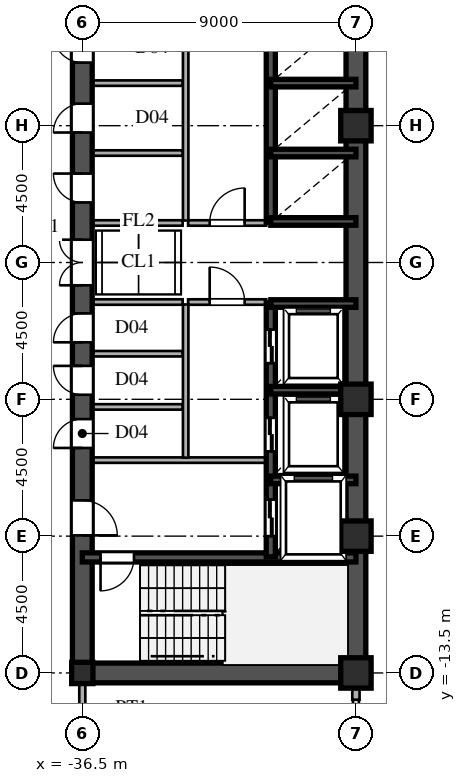
"""IFC4 building model, lengths in metres.
Left out: names, types, materials, properties, quantities, classifications, styles, units other than length and angle.
Written with IfcOpenShell. Run it as: python <this file> out.ifc"""

import sys

from ifc_helpers import new_model, si_unit, direction, frame, frame_2d, origin, origin_2d, place, context, subcontext, project, spatial, rectangle, hollow_rectangle, i_section, extrude, source, transform, mapped, element, fill, save


model = new_model("IFC4")
c1 = context("Model", 3, precision=1e-05, world=origin(), true_north=direction((0.0, 1.0)))
c2 = subcontext(c1, "Body", "Model", "MODEL_VIEW")
j1 = project(units=[si_unit("LENGTHUNIT", "METRE"), si_unit("PLANEANGLEUNIT", "RADIAN")], contexts=[c1])
p1 = place(None, origin())
s1 = spatial("IfcSite", under=j1, at=p1, CompositionType="ELEMENT")
p2 = place(p1, origin())
s2 = spatial("IfcBuilding", under=s1, at=p2, CompositionType="ELEMENT")
p3 = place(p2, frame((0.0, 0.0, 124.8)))
s3 = spatial("IfcBuildingStorey", under=s2, at=p3, CompositionType="ELEMENT", Elevation=124.8)
m1 = source(origin(), c2, "Body", "SweptSolid", [
    extrude(hollow_rectangle(XDim=1.0, YDim=1.0, WallThickness=0.042, at=origin_2d()), origin(), (0.0, 0.0, 1.0), 3.6),
])
for number, where, z_axis, x_axis in (
    (1, (-27.5, -13.5, 0.0), (0.0, 0.0, 1.0), (1.0, 0.0, 0.0)),
    (2, (-27.5, -9.0, 0.0), (0.0, 0.0, 1.0), (1.0, 0.0, 0.0)),
    (3, (-27.5, -4.5, 0.0), (0.0, 0.0, 1.0), (1.0, 0.0, 0.0)),
    (4, (-27.5, 4.5, 0.0), (0.0, 0.0, 1.0), (1.0, 0.0, 0.0)),
):
    element("IfcColumn", number, at=place(p3, frame(where, z_axis=z_axis, x_axis=x_axis)), inside=s3, PredefinedType="COLUMN", context=c2, shape_type="MappedRepresentation", body=[
        mapped(m1, transform((0.0, 0.0, 0.0), scale=1.0)),
    ])
m2 = source(origin(), c2, "Body", "SweptSolid", [
    extrude(i_section(OverallWidth=0.7, OverallDepth=0.7, WebThickness=0.028, FlangeThickness=0.045, at=origin_2d()), origin(), (0.0, 0.0, 1.0), 3.6),
])
p4 = place(p3, frame((-36.5, -13.5, 0.0), z_axis=(0.0, 0.0, 1.0), x_axis=(1.0, 0.0, 0.0)))
e5 = element("IfcColumn", 5, at=p4, inside=s3, PredefinedType="COLUMN", context=c2, shape_type="MappedRepresentation", body=[
    mapped(m2, transform((0.0, 0.0, 0.0), scale=1.0)),
])
p5 = place(p3, frame((-27.5, -14.38, 0.0), z_axis=(0.0, 0.0, 1.0), x_axis=(0.0, 1.0, 0.0)))
e6 = element("IfcWall", 6, at=p5, inside=s3, PredefinedType="SOLIDWALL", context=c2, shape_type="SweptSolid", body=[
    extrude(rectangle(XDim=0.55, YDim=0.24, at=frame_2d((0.275, 0.0))), origin(), (0.0, 0.0, 1.0), 2.88),
])
for number, where, z_axis, x_axis in (
    (7, (-27.5, -13.5, 0.0), (0.0, 0.0, 1.0), (0.0, 1.0, 0.0)),
    (8, (-27.5, 1.3, 0.0), (0.0, 0.0, 1.0), (0.0, 1.0, 0.0)),
):
    element("IfcWall", number, at=place(p3, frame(where, z_axis=z_axis, x_axis=x_axis)), inside=s3, PredefinedType="SHEAR", context=c2, shape_type="SweptSolid", body=[
        extrude(rectangle(XDim=12.2, YDim=0.65, at=frame_2d((6.1, 0.0))), origin(), (0.0, 0.0, 1.0), 3.38),
    ])
p6 = place(p3, frame((-27.5, -1.3, 0.0), z_axis=(0.0, 0.0, 1.0), x_axis=(0.0, 1.0, 0.0)))
e9 = element("IfcWall", 9, at=p6, inside=s3, PredefinedType="SHEAR", context=c2, shape_type="SweptSolid", body=[
    extrude(rectangle(XDim=2.6, YDim=0.65, at=frame_2d((1.3, 0.0))), origin(), (0.0, 0.0, 1.0), 3.38),
])
p7 = place(p3, frame((-36.5, -13.5, 0.0), z_axis=(0.0, 0.0, 1.0), x_axis=(1.0, 0.0, 0.0)))
e10 = element("IfcWall", 10, at=p7, inside=s3, PredefinedType="SHEAR", context=c2, shape_type="SweptSolid", body=[
    extrude(rectangle(XDim=9.0, YDim=0.65, at=frame_2d((4.5, 0.0))), origin(), (0.0, 0.0, 1.0), 3.38),
])
p8 = place(p3, frame((-36.5, -13.65, 0.0), z_axis=(0.0, 0.0, 1.0), x_axis=(0.0, 1.0, 0.0)))
e11 = element("IfcWall", 11, at=p8, inside=s3, PredefinedType="SHEAR", context=c2, shape_type="SweptSolid", body=[
    extrude(rectangle(XDim=7.15, YDim=0.65, at=frame_2d((3.575, 0.0))), origin(), (0.0, 0.0, 1.0), 3.38),
])
p9 = place(p8, frame((4.675, 0.0, 0.0)))
e12 = element("IfcOpeningElement", 12, at=p9, cuts=e11, PredefinedType="OPENING", context=c2, shape_type="SweptSolid", body=[
    extrude(rectangle(XDim=1.15, YDim=2.2, at=frame_2d((0.575, 1.1))), frame((0.0, 0.335, 0.0), z_axis=(0.0, -1.0, 0.0), x_axis=(1.0, 0.0, 0.0)), (0.0, 0.0, 1.0), 0.67),
])
p10 = place(p3, frame((-36.5, -1.3, 0.0), z_axis=(0.0, 0.0, 1.0), x_axis=(0.0, 1.0, 0.0)))
e13 = element("IfcWall", 13, at=p10, inside=s3, PredefinedType="SHEAR", context=c2, shape_type="SweptSolid", body=[
    extrude(rectangle(XDim=2.6, YDim=0.65, at=frame_2d((1.3, 0.0))), origin(), (0.0, 0.0, 1.0), 3.38),
])
p11 = place(p10, frame((0.55, 0.0, 0.0)))
e14 = element("IfcOpeningElement", 14, at=p11, cuts=e13, PredefinedType="OPENING", context=c2, shape_type="SweptSolid", body=[
    extrude(rectangle(XDim=1.5, YDim=2.3, at=frame_2d((0.75, 1.15))), frame((0.0, 0.335, 0.0), z_axis=(0.0, -1.0, 0.0), x_axis=(1.0, 0.0, 0.0)), (0.0, 0.0, 1.0), 0.67),
])
p12 = place(p3, frame((-36.5, -6.5, 0.0), z_axis=(0.0, 0.0, 1.0), x_axis=(0.0, 1.0, 0.0)))
e15 = element("IfcWall", 15, at=p12, inside=s3, PredefinedType="SHEAR", context=c2, shape_type="SweptSolid", body=[
    extrude(rectangle(XDim=1.75, YDim=0.65, at=frame_2d((0.875, 0.0))), origin(), (0.0, 0.0, 1.0), 3.38),
])
p13 = place(p12, frame((0.4, 0.0, 0.0)))
e16 = element("IfcOpeningElement", 16, at=p13, cuts=e15, PredefinedType="OPENING", context=c2, shape_type="SweptSolid", body=[
    extrude(rectangle(XDim=0.95, YDim=2.15, at=frame_2d((0.475, 1.075))), frame((0.0, 0.335, 0.0), z_axis=(0.0, -1.0, 0.0), x_axis=(1.0, 0.0, 0.0)), (0.0, 0.0, 1.0), 0.67),
])
p14 = place(p3, frame((-36.5, -4.75, 0.0), z_axis=(0.0, 0.0, 1.0), x_axis=(0.0, 1.0, 0.0)))
e17 = element("IfcWall", 17, at=p14, inside=s3, PredefinedType="SHEAR", context=c2, shape_type="SweptSolid", body=[
    extrude(rectangle(XDim=1.75, YDim=0.65, at=frame_2d((0.875, 0.0))), origin(), (0.0, 0.0, 1.0), 3.38),
])
p15 = place(p14, frame((0.4, 0.0, 0.0)))
e18 = element("IfcOpeningElement", 18, at=p15, cuts=e17, PredefinedType="OPENING", context=c2, shape_type="SweptSolid", body=[
    extrude(rectangle(XDim=0.95, YDim=2.15, at=frame_2d((0.475, 1.075))), frame((0.0, 0.335, 0.0), z_axis=(0.0, -1.0, 0.0), x_axis=(1.0, 0.0, 0.0)), (0.0, 0.0, 1.0), 0.67),
])
p16 = place(p3, frame((-36.5, -3.0, 0.0), z_axis=(0.0, 0.0, 1.0), x_axis=(0.0, 1.0, 0.0)))
e19 = element("IfcWall", 19, at=p16, inside=s3, PredefinedType="SHEAR", context=c2, shape_type="SweptSolid", body=[
    extrude(rectangle(XDim=1.7, YDim=0.65, at=frame_2d((0.85, 0.0))), origin(), (0.0, 0.0, 1.0), 3.38),
])
p17 = place(p16, frame((0.375, 0.0, 0.0)))
e20 = element("IfcOpeningElement", 20, at=p17, cuts=e19, PredefinedType="OPENING", context=c2, shape_type="SweptSolid", body=[
    extrude(rectangle(XDim=0.95, YDim=2.15, at=frame_2d((0.475, 1.075))), frame((0.0, 0.335, 0.0), z_axis=(0.0, -1.0, 0.0), x_axis=(1.0, 0.0, 0.0)), (0.0, 0.0, 1.0), 0.67),
])
p18 = place(p3, frame((-36.5, 1.3, 0.0), z_axis=(0.0, 0.0, 1.0), x_axis=(0.0, 1.0, 0.0)))
e21 = element("IfcWall", 21, at=p18, inside=s3, PredefinedType="SHEAR", context=c2, shape_type="SweptSolid", body=[
    extrude(rectangle(XDim=2.3, YDim=0.65, at=frame_2d((1.15, 0.0))), origin(), (0.0, 0.0, 1.0), 3.38),
])
p19 = place(p18, frame((0.675, 0.0, 0.0)))
e22 = element("IfcOpeningElement", 22, at=p19, cuts=e21, PredefinedType="OPENING", context=c2, shape_type="SweptSolid", body=[
    extrude(rectangle(XDim=0.95, YDim=2.15, at=frame_2d((0.475, 1.075))), frame((0.0, 0.335, 0.0), z_axis=(0.0, -1.0, 0.0), x_axis=(1.0, 0.0, 0.0)), (0.0, 0.0, 1.0), 0.67),
])
p20 = place(p3, frame((-36.5, 3.6, 0.0), z_axis=(0.0, 0.0, 1.0), x_axis=(0.0, 1.0, 0.0)))
e23 = element("IfcWall", 23, at=p20, inside=s3, PredefinedType="SHEAR", context=c2, shape_type="SweptSolid", body=[
    extrude(rectangle(XDim=2.3, YDim=0.65, at=frame_2d((1.15, 0.0))), origin(), (0.0, 0.0, 1.0), 3.38),
])
p21 = place(p20, frame((0.675, 0.0, 0.0)))
e24 = element("IfcOpeningElement", 24, at=p21, cuts=e23, PredefinedType="OPENING", context=c2, shape_type="SweptSolid", body=[
    extrude(rectangle(XDim=0.95, YDim=2.15, at=frame_2d((0.475, 1.075))), frame((0.0, 0.335, 0.0), z_axis=(0.0, -1.0, 0.0), x_axis=(1.0, 0.0, 0.0)), (0.0, 0.0, 1.0), 0.67),
])
p22 = place(p3, frame((-36.5, 5.9, 0.0), z_axis=(0.0, 0.0, 1.0), x_axis=(0.0, 1.0, 0.0)))
e25 = element("IfcWall", 25, at=p22, inside=s3, PredefinedType="SHEAR", context=c2, shape_type="SweptSolid", body=[
    extrude(rectangle(XDim=2.3, YDim=0.65, at=frame_2d((1.15, 0.0))), origin(), (0.0, 0.0, 1.0), 3.38),
])
p23 = place(p22, frame((0.675, 0.0, 0.0)))
e26 = element("IfcOpeningElement", 26, at=p23, cuts=e25, PredefinedType="OPENING", context=c2, shape_type="SweptSolid", body=[
    extrude(rectangle(XDim=0.95, YDim=2.15, at=frame_2d((0.475, 1.075))), frame((0.0, 0.335, 0.0), z_axis=(0.0, -1.0, 0.0), x_axis=(1.0, 0.0, 0.0)), (0.0, 0.0, 1.0), 0.67),
])
p24 = place(p3, frame((-36.5, -9.7, 0.0), z_axis=(0.0, 0.0, 1.0), x_axis=(1.0, 0.0, 0.0)))
e27 = element("IfcWall", 27, at=p24, inside=s3, PredefinedType="SHEAR", context=c2, shape_type="SweptSolid", body=[
    extrude(rectangle(XDim=9.0, YDim=0.3, at=frame_2d((4.5, 0.0))), origin(), (0.0, 0.0, 1.0), 3.38),
])
p25 = place(p24, frame((0.6, 0.0, 0.0)))
e28 = element("IfcOpeningElement", 28, at=p25, cuts=e27, PredefinedType="OPENING", context=c2, shape_type="SweptSolid", body=[
    extrude(rectangle(XDim=1.1, YDim=2.2, at=frame_2d((0.55, 1.1))), frame((0.0, 0.16, 0.0), z_axis=(0.0, -1.0, 0.0), x_axis=(1.0, 0.0, 0.0)), (0.0, 0.0, 1.0), 0.32),
])
for number, where, z_axis, x_axis in (
    (29, (-30.3, -7.15, 0.0), (0.0, 0.0, 1.0), (1.0, 0.0, 0.0)),
    (30, (-30.3, -4.2, 0.0), (0.0, 0.0, 1.0), (1.0, 0.0, 0.0)),
    (31, (-30.3, -1.35, 0.0), (0.0, 0.0, 1.0), (1.0, 0.0, 0.0)),
    (32, (-30.3, 1.35, 0.0), (0.0, 0.0, 1.0), (1.0, 0.0, 0.0)),
    (33, (-30.3, 3.6, 0.0), (0.0, 0.0, 1.0), (1.0, 0.0, 0.0)),
    (34, (-30.3, 5.9, 0.0), (0.0, 0.0, 1.0), (1.0, 0.0, 0.0)),
):
    element("IfcWall", number, at=place(p3, frame(where, z_axis=z_axis, x_axis=x_axis)), inside=s3, PredefinedType="SHEAR", context=c2, shape_type="SweptSolid", body=[
        extrude(rectangle(XDim=2.8, YDim=0.25, at=frame_2d((1.4, 0.0))), origin(), (0.0, 0.0, 1.0), 3.38),
    ])
p26 = place(p3, frame((-30.3, -9.68, 0.0), z_axis=(0.0, 0.0, 1.0), x_axis=(0.0, 1.0, 0.0)))
e35 = element("IfcWall", 35, at=p26, inside=s3, PredefinedType="SHEAR", context=c2, shape_type="SweptSolid", body=[
    extrude(rectangle(XDim=2.56, YDim=0.3, at=frame_2d((1.28, 0.0))), origin(), (0.0, 0.0, 1.0), 3.38),
])
p27 = place(p26, frame((0.68, 0.0, 0.0)))
e36 = element("IfcOpeningElement", 36, at=p27, cuts=e35, PredefinedType="OPENING", context=c2, shape_type="SweptSolid", body=[
    extrude(rectangle(XDim=1.2, YDim=2.25, at=frame_2d((0.6, 1.125))), frame((0.0, 0.16, 0.0), z_axis=(0.0, -1.0, 0.0), x_axis=(1.0, 0.0, 0.0)), (0.0, 0.0, 1.0), 0.32),
])
p28 = place(p3, frame((-30.3, -7.12, 0.0), z_axis=(0.0, 0.0, 1.0), x_axis=(0.0, 1.0, 0.0)))
e37 = element("IfcWall", 37, at=p28, inside=s3, PredefinedType="SHEAR", context=c2, shape_type="SweptSolid", body=[
    extrude(rectangle(XDim=2.92, YDim=0.3, at=frame_2d((1.46, 0.0))), origin(), (0.0, 0.0, 1.0), 3.38),
])
p29 = place(p28, frame((0.91, 0.0, 0.0)))
e38 = element("IfcOpeningElement", 38, at=p29, cuts=e37, PredefinedType="OPENING", context=c2, shape_type="SweptSolid", body=[
    extrude(rectangle(XDim=1.1, YDim=2.2, at=frame_2d((0.55, 1.1))), frame((0.0, 0.16, 0.0), z_axis=(0.0, -1.0, 0.0), x_axis=(1.0, 0.0, 0.0)), (0.0, 0.0, 1.0), 0.32),
])
p30 = place(p3, frame((-30.3, -4.2, 0.0), z_axis=(0.0, 0.0, 1.0), x_axis=(0.0, 1.0, 0.0)))
e39 = element("IfcWall", 39, at=p30, inside=s3, PredefinedType="SHEAR", context=c2, shape_type="SweptSolid", body=[
    extrude(rectangle(XDim=2.88, YDim=0.3, at=frame_2d((1.44, 0.0))), origin(), (0.0, 0.0, 1.0), 3.38),
])
p31 = place(p30, frame((0.89, 0.0, 0.0)))
e40 = element("IfcOpeningElement", 40, at=p31, cuts=e39, PredefinedType="OPENING", context=c2, shape_type="SweptSolid", body=[
    extrude(rectangle(XDim=1.1, YDim=2.2, at=frame_2d((0.55, 1.1))), frame((0.0, 0.16, 0.0), z_axis=(0.0, -1.0, 0.0), x_axis=(1.0, 0.0, 0.0)), (0.0, 0.0, 1.0), 0.32),
])
p32 = place(p3, frame((-30.3, 1.32, 0.0), z_axis=(0.0, 0.0, 1.0), x_axis=(0.0, 1.0, 0.0)))
e41 = element("IfcWall", 41, at=p32, inside=s3, PredefinedType="SHEAR", context=c2, shape_type="SweptSolid", body=[
    extrude(rectangle(XDim=2.28, YDim=0.3, at=frame_2d((1.14, 0.0))), origin(), (0.0, 0.0, 1.0), 3.38),
])
p33 = place(p3, frame((-30.3, 3.6, 0.0), z_axis=(0.0, 0.0, 1.0), x_axis=(0.0, 1.0, 0.0)))
e42 = element("IfcWall", 42, at=p33, inside=s3, PredefinedType="SHEAR", context=c2, shape_type="SweptSolid", body=[
    extrude(rectangle(XDim=2.3, YDim=0.3, at=frame_2d((1.15, 0.0))), origin(), (0.0, 0.0, 1.0), 3.38),
])
p34 = place(p3, frame((-30.3, 5.9, 0.0), z_axis=(0.0, 0.0, 1.0), x_axis=(0.0, 1.0, 0.0)))
e43 = element("IfcWall", 43, at=p34, inside=s3, PredefinedType="SHEAR", context=c2, shape_type="SweptSolid", body=[
    extrude(rectangle(XDim=2.25, YDim=0.3, at=frame_2d((1.125, 0.0))), origin(), (0.0, 0.0, 1.0), 3.38),
])
p35 = place(p3, frame((-36.15, -6.5, 0.0), z_axis=(0.0, 0.0, 1.0), x_axis=(1.0, 0.0, 0.0)))
e44 = element("IfcWall", 44, at=p35, inside=s3, PredefinedType="PARTITIONING", context=c2, shape_type="SweptSolid", body=[
    extrude(rectangle(XDim=5.7, YDim=0.18, at=frame_2d((2.85, 0.0))), origin(), (0.0, 0.0, 1.0), 3.38),
])
p36 = place(p3, frame((-33.1, -6.42, 0.0), z_axis=(0.0, 0.0, 1.0), x_axis=(0.0, 1.0, 0.0)))
e45 = element("IfcWall", 45, at=p36, inside=s3, PredefinedType="PARTITIONING", context=c2, shape_type="SweptSolid", body=[
    extrude(rectangle(XDim=5.04, YDim=0.18, at=frame_2d((2.52, 0.0))), origin(), (0.0, 0.0, 1.0), 3.38),
])
p37 = place(p3, frame((-33.1, 1.38, 0.0), z_axis=(0.0, 0.0, 1.0), x_axis=(0.0, 1.0, 0.0)))
e46 = element("IfcWall", 46, at=p37, inside=s3, PredefinedType="PARTITIONING", context=c2, shape_type="SweptSolid", body=[
    extrude(rectangle(XDim=6.74, YDim=0.18, at=frame_2d((3.37, 0.0))), origin(), (0.0, 0.0, 1.0), 3.38),
])
p38 = place(p3, frame((-33.02, -1.3, 0.0), z_axis=(0.0, 0.0, 1.0), x_axis=(1.0, 0.0, 0.0)))
e47 = element("IfcWall", 47, at=p38, inside=s3, PredefinedType="PARTITIONING", context=c2, shape_type="SweptSolid", body=[
    extrude(rectangle(XDim=2.57, YDim=0.18, at=frame_2d((1.285, 0.0))), origin(), (0.0, 0.0, 1.0), 3.38),
])
p39 = place(p38, frame((0.71, 0.0, 0.0)))
e48 = element("IfcOpeningElement", 48, at=p39, cuts=e47, PredefinedType="OPENING", context=c2, shape_type="SweptSolid", body=[
    extrude(rectangle(XDim=1.15, YDim=2.2, at=frame_2d((0.575, 1.1))), frame((0.0, 0.1, 0.0), z_axis=(0.0, -1.0, 0.0), x_axis=(1.0, 0.0, 0.0)), (0.0, 0.0, 1.0), 0.2),
])
p40 = place(p3, frame((-33.02, 1.3, 0.0), z_axis=(0.0, 0.0, 1.0), x_axis=(1.0, 0.0, 0.0)))
e49 = element("IfcWall", 49, at=p40, inside=s3, PredefinedType="PARTITIONING", context=c2, shape_type="SweptSolid", body=[
    extrude(rectangle(XDim=2.57, YDim=0.18, at=frame_2d((1.285, 0.0))), origin(), (0.0, 0.0, 1.0), 3.38),
])
p41 = place(p40, frame((0.71, 0.0, 0.0)))
e50 = element("IfcOpeningElement", 50, at=p41, cuts=e49, PredefinedType="OPENING", context=c2, shape_type="SweptSolid", body=[
    extrude(rectangle(XDim=1.15, YDim=2.2, at=frame_2d((0.575, 1.1))), frame((0.0, 0.1, 0.0), z_axis=(0.0, -1.0, 0.0), x_axis=(1.0, 0.0, 0.0)), (0.0, 0.0, 1.0), 0.2),
])
for number, where, z_axis, x_axis in (
    (51, (-36.15, -1.3, 0.0), (0.0, 0.0, 1.0), (1.0, 0.0, 0.0)),
    (52, (-36.15, 1.3, 0.0), (0.0, 0.0, 1.0), (1.0, 0.0, 0.0)),
    (53, (-36.15, -4.75, 0.0), (0.0, 0.0, 1.0), (1.0, 0.0, 0.0)),
    (54, (-36.15, -3.0, 0.0), (0.0, 0.0, 1.0), (1.0, 0.0, 0.0)),
    (55, (-36.15, 3.6, 0.0), (0.0, 0.0, 1.0), (1.0, 0.0, 0.0)),
    (56, (-36.15, 5.9, 0.0), (0.0, 0.0, 1.0), (1.0, 0.0, 0.0)),
):
    element("IfcWall", number, at=place(p3, frame(where, z_axis=z_axis, x_axis=x_axis)), inside=s3, PredefinedType="PARTITIONING", context=c2, shape_type="SweptSolid", body=[
        extrude(rectangle(XDim=2.95, YDim=0.18, at=frame_2d((1.475, 0.0))), origin(), (0.0, 0.0, 1.0), 3.38),
    ])
p42 = place(p3, frame((-36.5, -15.515, 0.0), z_axis=(0.0, 0.0, 1.0), x_axis=(0.0, 1.0, 0.0)))
e57 = element("IfcWall", 57, at=p42, inside=s3, PredefinedType="PARTITIONING", context=c2, shape_type="SweptSolid", body=[
    extrude(rectangle(XDim=1.685, YDim=0.2, at=frame_2d((0.842, 0.0))), origin(), (0.0, 0.0, 1.0), 2.78),
])
m3 = source(origin(), c2, "Body", "SweptSolid", [
    extrude(rectangle(XDim=1.15, YDim=2.2, at=frame_2d((0.575, 1.1))), frame((0.0, 0.025, 0.0), z_axis=(0.0, -1.0, 0.0), x_axis=(1.0, 0.0, 0.0)), (0.0, 0.0, 1.0), 0.05),
])
p43 = place(p9, frame((1.15, 0.0, 0.0), z_axis=(0.0, 0.0, 1.0), x_axis=(-1.0, 0.0, 0.0)))
e58 = element("IfcDoor", 58, at=p43, inside=s3, OperationType="SINGLE_SWING_LEFT", PredefinedType="DOOR", context=c2, shape_type="MappedRepresentation", body=[
    mapped(m3, transform((0.0, 0.0, 0.0), scale=1.0)),
])
fill(e12, e58)
m4 = source(origin(), c2, "Body", "SweptSolid", [
    extrude(rectangle(XDim=1.5, YDim=2.3, at=frame_2d((0.75, 1.15))), frame((0.0, 0.025, 0.0), z_axis=(0.0, -1.0, 0.0), x_axis=(1.0, 0.0, 0.0)), (0.0, 0.0, 1.0), 0.05),
])
p44 = place(p11, origin())
e59 = element("IfcDoor", 59, at=p44, inside=s3, OperationType="DOUBLE_SWING_LEFT", PredefinedType="DOOR", context=c2, shape_type="MappedRepresentation", body=[
    mapped(m4, transform((0.0, 0.0, 0.0), scale=1.0)),
])
fill(e14, e59)
m5 = source(origin(), c2, "Body", "SweptSolid", [
    extrude(rectangle(XDim=0.95, YDim=2.15, at=frame_2d((0.475, 1.075))), frame((0.0, 0.025, 0.0), z_axis=(0.0, -1.0, 0.0), x_axis=(1.0, 0.0, 0.0)), (0.0, 0.0, 1.0), 0.05),
])
p45 = place(p13, origin())
e60 = element("IfcDoor", 60, at=p45, inside=s3, OperationType="SINGLE_SWING_LEFT", PredefinedType="DOOR", context=c2, shape_type="MappedRepresentation", body=[
    mapped(m5, transform((0.0, 0.0, 0.0), scale=1.0)),
])
fill(e16, e60)
p46 = place(p15, origin())
e61 = element("IfcDoor", 61, at=p46, inside=s3, OperationType="SINGLE_SWING_RIGHT", PredefinedType="DOOR", context=c2, shape_type="MappedRepresentation", body=[
    mapped(m5, transform((0.0, 0.0, 0.0), scale=1.0)),
])
fill(e18, e61)
p47 = place(p17, origin())
e62 = element("IfcDoor", 62, at=p47, inside=s3, OperationType="SINGLE_SWING_LEFT", PredefinedType="DOOR", context=c2, shape_type="MappedRepresentation", body=[
    mapped(m5, transform((0.0, 0.0, 0.0), scale=1.0)),
])
fill(e20, e62)
p48 = place(p19, origin())
e63 = element("IfcDoor", 63, at=p48, inside=s3, OperationType="SINGLE_SWING_RIGHT", PredefinedType="DOOR", context=c2, shape_type="MappedRepresentation", body=[
    mapped(m5, transform((0.0, 0.0, 0.0), scale=1.0)),
])
fill(e22, e63)
p49 = place(p21, origin())
e64 = element("IfcDoor", 64, at=p49, inside=s3, OperationType="SINGLE_SWING_LEFT", PredefinedType="DOOR", context=c2, shape_type="MappedRepresentation", body=[
    mapped(m5, transform((0.0, 0.0, 0.0), scale=1.0)),
])
fill(e24, e64)
p50 = place(p23, origin())
e65 = element("IfcDoor", 65, at=p50, inside=s3, OperationType="SINGLE_SWING_RIGHT", PredefinedType="DOOR", context=c2, shape_type="MappedRepresentation", body=[
    mapped(m5, transform((0.0, 0.0, 0.0), scale=1.0)),
])
fill(e26, e65)
m6 = source(origin(), c2, "Body", "SweptSolid", [
    extrude(rectangle(XDim=1.1, YDim=2.2, at=frame_2d((0.55, 1.1))), frame((0.0, 0.025, 0.0), z_axis=(0.0, -1.0, 0.0), x_axis=(1.0, 0.0, 0.0)), (0.0, 0.0, 1.0), 0.05),
])
p51 = place(p25, frame((1.1, 0.0, 0.0), z_axis=(0.0, 0.0, 1.0), x_axis=(-1.0, 0.0, 0.0)))
e66 = element("IfcDoor", 66, at=p51, inside=s3, OperationType="SINGLE_SWING_LEFT", PredefinedType="DOOR", context=c2, shape_type="MappedRepresentation", body=[
    mapped(m6, transform((0.0, 0.0, 0.0), scale=1.0)),
])
fill(e28, e66)
m7 = source(origin(), c2, "Body", "SweptSolid", [
    extrude(rectangle(XDim=1.2, YDim=2.25, at=frame_2d((0.6, 1.125))), frame((0.0, 0.025, 0.0), z_axis=(0.0, -1.0, 0.0), x_axis=(1.0, 0.0, 0.0)), (0.0, 0.0, 1.0), 0.05),
])
p52 = place(p27, origin())
e67 = element("IfcDoor", 67, at=p52, inside=s3, OperationType="DOUBLE_DOOR_SLIDING", PredefinedType="DOOR", context=c2, shape_type="MappedRepresentation", body=[
    mapped(m7, transform((0.0, 0.0, 0.0), scale=1.0)),
])
fill(e36, e67)
m8 = source(origin(), c2, "Body", "SweptSolid", [
    extrude(rectangle(XDim=1.1, YDim=2.2, at=frame_2d((0.55, 1.1))), frame((0.0, 0.025, 0.0), z_axis=(0.0, -1.0, 0.0), x_axis=(1.0, 0.0, 0.0)), (0.0, 0.0, 1.0), 0.05),
])
p53 = place(p29, origin())
e68 = element("IfcDoor", 68, at=p53, inside=s3, OperationType="DOUBLE_DOOR_SLIDING", PredefinedType="DOOR", context=c2, shape_type="MappedRepresentation", body=[
    mapped(m8, transform((0.0, 0.0, 0.0), scale=1.0)),
])
fill(e38, e68)
p54 = place(p31, origin())
e69 = element("IfcDoor", 69, at=p54, inside=s3, OperationType="DOUBLE_DOOR_SLIDING", PredefinedType="DOOR", context=c2, shape_type="MappedRepresentation", body=[
    mapped(m8, transform((0.0, 0.0, 0.0), scale=1.0)),
])
fill(e40, e69)
p55 = place(p39, origin())
e70 = element("IfcDoor", 70, at=p55, inside=s3, OperationType="SINGLE_SWING_LEFT", PredefinedType="DOOR", context=c2, shape_type="MappedRepresentation", body=[
    mapped(m3, transform((0.0, 0.0, 0.0), scale=1.0)),
])
fill(e48, e70)
p56 = place(p41, origin())
e71 = element("IfcDoor", 71, at=p56, inside=s3, OperationType="SINGLE_SWING_RIGHT", PredefinedType="DOOR", context=c2, shape_type="MappedRepresentation", body=[
    mapped(m3, transform((0.0, 0.0, 0.0), scale=1.0)),
])
fill(e50, e71)
save(model, sys.argv[1])
